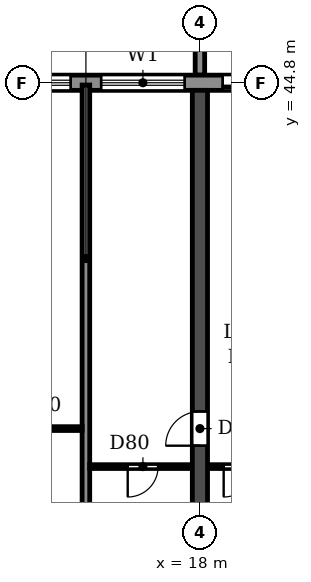
"""IFC4 building model, lengths in metres.
Left out: names, types, materials, properties, quantities, classifications, styles, units other than length and angle.
Written with IfcOpenShell. Run it as: python <this file> out.ifc"""

import sys

from ifc_helpers import new_model, si_unit, direction, frame, frame_2d, origin, place, context, subcontext, project, spatial, polyline, rectangle, outline, extrude, source, transform, mapped, element, fill, save


model = new_model("IFC4")
c1 = context("Model", 3, precision=1e-05, world=origin(), true_north=direction((0.0, 1.0)))
c2 = subcontext(c1, "Body", "Model", "MODEL_VIEW")
j1 = project(units=[si_unit("LENGTHUNIT", "METRE"), si_unit("PLANEANGLEUNIT", "RADIAN")], contexts=[c1])
p1 = place(None, origin())
s1 = spatial("IfcSite", under=j1, at=p1, CompositionType="ELEMENT")
p2 = place(p1, origin())
s2 = spatial("IfcBuilding", under=s1, at=p2, CompositionType="ELEMENT")
p3 = place(p2, frame((0.0, 0.0, 26.7)))
s3 = spatial("IfcBuildingStorey", under=s2, at=p3, CompositionType="ELEMENT", Elevation=26.7)
p4 = place(p3, frame((18.0, 30.55, 0.0), z_axis=(0.0, 0.0, 1.0), x_axis=(0.0, 1.0, 0.0)))
e1 = element("IfcWall", 1, at=p4, inside=s3, PredefinedType="SHEAR", context=c2, shape_type="SweptSolid", body=[
    extrude(rectangle(XDim=14.05, YDim=0.4, at=frame_2d((7.025, 0.0))), origin(), (0.0, 0.0, 1.0), 3.05),
])
p5 = place(p4, frame((4.7, 0.0, 0.0)))
e2 = element("IfcOpeningElement", 2, at=p5, cuts=e1, PredefinedType="OPENING", context=c2, shape_type="SweptSolid", body=[
    extrude(rectangle(XDim=0.9, YDim=2.1, at=frame_2d((0.45, 1.05))), frame((0.0, 0.21, 0.0), z_axis=(0.0, -1.0, 0.0), x_axis=(1.0, 0.0, 0.0)), (0.0, 0.0, 1.0), 0.42),
])
p6 = place(p3, frame((97.317, 44.8, 0.0), z_axis=(0.0, 0.0, 1.0), x_axis=(-1.0, 0.0, 0.0)))
e3 = element("IfcWall", 3, at=p6, inside=s3, PredefinedType="STANDARD", context=c2, shape_type="SweptSolid", body=[
    extrude(rectangle(XDim=92.634, YDim=0.4, at=frame_2d((46.317, 0.0))), origin(), (0.0, 0.0, 1.0), 3.05),
])
p7 = place(p6, frame((88.717, 0.0, 0.9)))
e4 = element("IfcOpeningElement", 4, at=p7, cuts=e3, PredefinedType="OPENING", context=c2, shape_type="SweptSolid", body=[
    extrude(rectangle(XDim=2.2, YDim=1.5, at=frame_2d((1.1, 0.75))), frame((0.0, 0.21, 0.0), z_axis=(0.0, -1.0, 0.0), x_axis=(1.0, 0.0, 0.0)), (0.0, 0.0, 1.0), 0.42),
])
p8 = place(p6, frame((85.917, 0.0, 0.0)))
e5 = element("IfcOpeningElement", 5, at=p8, cuts=e3, PredefinedType="OPENING", context=c2, shape_type="SweptSolid", body=[
    extrude(rectangle(XDim=1.8, YDim=2.4, at=frame_2d((0.9, 1.2))), frame((0.0, 0.21, 0.0), z_axis=(0.0, -1.0, 0.0), x_axis=(1.0, 0.0, 0.0)), (0.0, 0.0, 1.0), 0.42),
])
p9 = place(p6, frame((82.717, 0.0, 0.9)))
e6 = element("IfcOpeningElement", 6, at=p9, cuts=e3, PredefinedType="OPENING", context=c2, shape_type="SweptSolid", body=[
    extrude(rectangle(XDim=2.2, YDim=1.5, at=frame_2d((1.1, 0.75))), frame((0.0, 0.21, 0.0), z_axis=(0.0, -1.0, 0.0), x_axis=(1.0, 0.0, 0.0)), (0.0, 0.0, 1.0), 0.42),
])
p10 = place(p6, frame((79.717, 0.0, 0.9)))
e7 = element("IfcOpeningElement", 7, at=p10, cuts=e3, PredefinedType="OPENING", context=c2, shape_type="SweptSolid", body=[
    extrude(rectangle(XDim=2.2, YDim=1.5, at=frame_2d((1.1, 0.75))), frame((0.0, 0.21, 0.0), z_axis=(0.0, -1.0, 0.0), x_axis=(1.0, 0.0, 0.0)), (0.0, 0.0, 1.0), 0.42),
])
p11 = place(p6, frame((76.917, 0.0, 0.0)))
e8 = element("IfcOpeningElement", 8, at=p11, cuts=e3, PredefinedType="OPENING", context=c2, shape_type="SweptSolid", body=[
    extrude(rectangle(XDim=1.8, YDim=2.4, at=frame_2d((0.9, 1.2))), frame((0.0, 0.21, 0.0), z_axis=(0.0, -1.0, 0.0), x_axis=(1.0, 0.0, 0.0)), (0.0, 0.0, 1.0), 0.42),
])
p12 = place(p6, frame((73.717, 0.0, 0.9)))
e9 = element("IfcOpeningElement", 9, at=p12, cuts=e3, PredefinedType="OPENING", context=c2, shape_type="SweptSolid", body=[
    extrude(rectangle(XDim=2.2, YDim=1.5, at=frame_2d((1.1, 0.75))), frame((0.0, 0.21, 0.0), z_axis=(0.0, -1.0, 0.0), x_axis=(1.0, 0.0, 0.0)), (0.0, 0.0, 1.0), 0.42),
])
p13 = place(p6, frame((70.717, 0.0, 0.9)))
e10 = element("IfcOpeningElement", 10, at=p13, cuts=e3, PredefinedType="OPENING", context=c2, shape_type="SweptSolid", body=[
    extrude(rectangle(XDim=2.2, YDim=1.5, at=frame_2d((1.1, 0.75))), frame((0.0, 0.21, 0.0), z_axis=(0.0, -1.0, 0.0), x_axis=(1.0, 0.0, 0.0)), (0.0, 0.0, 1.0), 0.42),
])
p14 = place(p6, frame((67.717, 0.0, 0.9)))
e11 = element("IfcOpeningElement", 11, at=p14, cuts=e3, PredefinedType="OPENING", context=c2, shape_type="SweptSolid", body=[
    extrude(rectangle(XDim=2.2, YDim=1.5, at=frame_2d((1.1, 0.75))), frame((0.0, 0.21, 0.0), z_axis=(0.0, -1.0, 0.0), x_axis=(1.0, 0.0, 0.0)), (0.0, 0.0, 1.0), 0.42),
])
p15 = place(p6, frame((64.917, 0.0, 0.0)))
e12 = element("IfcOpeningElement", 12, at=p15, cuts=e3, PredefinedType="OPENING", context=c2, shape_type="SweptSolid", body=[
    extrude(rectangle(XDim=1.8, YDim=2.4, at=frame_2d((0.9, 1.2))), frame((0.0, 0.21, 0.0), z_axis=(0.0, -1.0, 0.0), x_axis=(1.0, 0.0, 0.0)), (0.0, 0.0, 1.0), 0.42),
])
p16 = place(p6, frame((61.717, 0.0, 0.9)))
e13 = element("IfcOpeningElement", 13, at=p16, cuts=e3, PredefinedType="OPENING", context=c2, shape_type="SweptSolid", body=[
    extrude(rectangle(XDim=2.2, YDim=1.5, at=frame_2d((1.1, 0.75))), frame((0.0, 0.21, 0.0), z_axis=(0.0, -1.0, 0.0), x_axis=(1.0, 0.0, 0.0)), (0.0, 0.0, 1.0), 0.42),
])
p17 = place(p6, frame((58.717, 0.0, 0.9)))
e14 = element("IfcOpeningElement", 14, at=p17, cuts=e3, PredefinedType="OPENING", context=c2, shape_type="SweptSolid", body=[
    extrude(rectangle(XDim=2.2, YDim=1.5, at=frame_2d((1.1, 0.75))), frame((0.0, 0.21, 0.0), z_axis=(0.0, -1.0, 0.0), x_axis=(1.0, 0.0, 0.0)), (0.0, 0.0, 1.0), 0.42),
])
p18 = place(p6, frame((55.917, 0.0, 0.0)))
e15 = element("IfcOpeningElement", 15, at=p18, cuts=e3, PredefinedType="OPENING", context=c2, shape_type="SweptSolid", body=[
    extrude(rectangle(XDim=1.8, YDim=2.4, at=frame_2d((0.9, 1.2))), frame((0.0, 0.21, 0.0), z_axis=(0.0, -1.0, 0.0), x_axis=(1.0, 0.0, 0.0)), (0.0, 0.0, 1.0), 0.42),
])
p19 = place(p6, frame((52.917, 0.0, 0.0)))
e16 = element("IfcOpeningElement", 16, at=p19, cuts=e3, PredefinedType="OPENING", context=c2, shape_type="SweptSolid", body=[
    extrude(rectangle(XDim=1.8, YDim=2.4, at=frame_2d((0.9, 1.2))), frame((0.0, 0.21, 0.0), z_axis=(0.0, -1.0, 0.0), x_axis=(1.0, 0.0, 0.0)), (0.0, 0.0, 1.0), 0.42),
])
p20 = place(p6, frame((49.717, 0.0, 0.9)))
e17 = element("IfcOpeningElement", 17, at=p20, cuts=e3, PredefinedType="OPENING", context=c2, shape_type="SweptSolid", body=[
    extrude(rectangle(XDim=2.2, YDim=1.5, at=frame_2d((1.1, 0.75))), frame((0.0, 0.21, 0.0), z_axis=(0.0, -1.0, 0.0), x_axis=(1.0, 0.0, 0.0)), (0.0, 0.0, 1.0), 0.42),
])
p21 = place(p6, frame((46.917, 0.0, 0.0)))
e18 = element("IfcOpeningElement", 18, at=p21, cuts=e3, PredefinedType="OPENING", context=c2, shape_type="SweptSolid", body=[
    extrude(rectangle(XDim=1.8, YDim=2.4, at=frame_2d((0.9, 1.2))), frame((0.0, 0.21, 0.0), z_axis=(0.0, -1.0, 0.0), x_axis=(1.0, 0.0, 0.0)), (0.0, 0.0, 1.0), 0.42),
])
p22 = place(p6, frame((43.717, 0.0, 0.9)))
e19 = element("IfcOpeningElement", 19, at=p22, cuts=e3, PredefinedType="OPENING", context=c2, shape_type="SweptSolid", body=[
    extrude(rectangle(XDim=2.2, YDim=1.5, at=frame_2d((1.1, 0.75))), frame((0.0, 0.21, 0.0), z_axis=(0.0, -1.0, 0.0), x_axis=(1.0, 0.0, 0.0)), (0.0, 0.0, 1.0), 0.42),
])
p23 = place(p6, frame((40.717, 0.0, 0.9)))
e20 = element("IfcOpeningElement", 20, at=p23, cuts=e3, PredefinedType="OPENING", context=c2, shape_type="SweptSolid", body=[
    extrude(rectangle(XDim=2.2, YDim=1.5, at=frame_2d((1.1, 0.75))), frame((0.0, 0.21, 0.0), z_axis=(0.0, -1.0, 0.0), x_axis=(1.0, 0.0, 0.0)), (0.0, 0.0, 1.0), 0.42),
])
p24 = place(p6, frame((37.917, 0.0, 0.0)))
e21 = element("IfcOpeningElement", 21, at=p24, cuts=e3, PredefinedType="OPENING", context=c2, shape_type="SweptSolid", body=[
    extrude(rectangle(XDim=1.8, YDim=2.4, at=frame_2d((0.9, 1.2))), frame((0.0, 0.21, 0.0), z_axis=(0.0, -1.0, 0.0), x_axis=(1.0, 0.0, 0.0)), (0.0, 0.0, 1.0), 0.42),
])
p25 = place(p6, frame((34.917, 0.0, 0.0)))
e22 = element("IfcOpeningElement", 22, at=p25, cuts=e3, PredefinedType="OPENING", context=c2, shape_type="SweptSolid", body=[
    extrude(rectangle(XDim=1.8, YDim=2.4, at=frame_2d((0.9, 1.2))), frame((0.0, 0.21, 0.0), z_axis=(0.0, -1.0, 0.0), x_axis=(1.0, 0.0, 0.0)), (0.0, 0.0, 1.0), 0.42),
])
p26 = place(p6, frame((31.717, 0.0, 0.9)))
e23 = element("IfcOpeningElement", 23, at=p26, cuts=e3, PredefinedType="OPENING", context=c2, shape_type="SweptSolid", body=[
    extrude(rectangle(XDim=2.2, YDim=1.5, at=frame_2d((1.1, 0.75))), frame((0.0, 0.21, 0.0), z_axis=(0.0, -1.0, 0.0), x_axis=(1.0, 0.0, 0.0)), (0.0, 0.0, 1.0), 0.42),
])
p27 = place(p6, frame((28.717, 0.0, 0.9)))
e24 = element("IfcOpeningElement", 24, at=p27, cuts=e3, PredefinedType="OPENING", context=c2, shape_type="SweptSolid", body=[
    extrude(rectangle(XDim=2.2, YDim=1.5, at=frame_2d((1.1, 0.75))), frame((0.0, 0.21, 0.0), z_axis=(0.0, -1.0, 0.0), x_axis=(1.0, 0.0, 0.0)), (0.0, 0.0, 1.0), 0.42),
])
p28 = place(p6, frame((25.717, 0.0, 0.9)))
e25 = element("IfcOpeningElement", 25, at=p28, cuts=e3, PredefinedType="OPENING", context=c2, shape_type="SweptSolid", body=[
    extrude(rectangle(XDim=2.2, YDim=1.5, at=frame_2d((1.1, 0.75))), frame((0.0, 0.21, 0.0), z_axis=(0.0, -1.0, 0.0), x_axis=(1.0, 0.0, 0.0)), (0.0, 0.0, 1.0), 0.42),
])
p29 = place(p6, frame((22.717, 0.0, 0.9)))
e26 = element("IfcOpeningElement", 26, at=p29, cuts=e3, PredefinedType="OPENING", context=c2, shape_type="SweptSolid", body=[
    extrude(rectangle(XDim=2.2, YDim=1.5, at=frame_2d((1.1, 0.75))), frame((0.0, 0.21, 0.0), z_axis=(0.0, -1.0, 0.0), x_axis=(1.0, 0.0, 0.0)), (0.0, 0.0, 1.0), 0.42),
])
p30 = place(p6, frame((19.917, 0.0, 0.0)))
e27 = element("IfcOpeningElement", 27, at=p30, cuts=e3, PredefinedType="OPENING", context=c2, shape_type="SweptSolid", body=[
    extrude(rectangle(XDim=1.8, YDim=2.4, at=frame_2d((0.9, 1.2))), frame((0.0, 0.21, 0.0), z_axis=(0.0, -1.0, 0.0), x_axis=(1.0, 0.0, 0.0)), (0.0, 0.0, 1.0), 0.42),
])
p31 = place(p6, frame((16.717, 0.0, 0.9)))
e28 = element("IfcOpeningElement", 28, at=p31, cuts=e3, PredefinedType="OPENING", context=c2, shape_type="SweptSolid", body=[
    extrude(rectangle(XDim=2.2, YDim=1.5, at=frame_2d((1.1, 0.75))), frame((0.0, 0.21, 0.0), z_axis=(0.0, -1.0, 0.0), x_axis=(1.0, 0.0, 0.0)), (0.0, 0.0, 1.0), 0.42),
])
p32 = place(p6, frame((13.717, 0.0, 0.9)))
e29 = element("IfcOpeningElement", 29, at=p32, cuts=e3, PredefinedType="OPENING", context=c2, shape_type="SweptSolid", body=[
    extrude(rectangle(XDim=2.2, YDim=1.5, at=frame_2d((1.1, 0.75))), frame((0.0, 0.21, 0.0), z_axis=(0.0, -1.0, 0.0), x_axis=(1.0, 0.0, 0.0)), (0.0, 0.0, 1.0), 0.42),
])
p33 = place(p6, frame((10.717, 0.0, 0.9)))
e30 = element("IfcOpeningElement", 30, at=p33, cuts=e3, PredefinedType="OPENING", context=c2, shape_type="SweptSolid", body=[
    extrude(rectangle(XDim=2.2, YDim=1.5, at=frame_2d((1.1, 0.75))), frame((0.0, 0.21, 0.0), z_axis=(0.0, -1.0, 0.0), x_axis=(1.0, 0.0, 0.0)), (0.0, 0.0, 1.0), 0.42),
])
p34 = place(p6, frame((7.917, 0.0, 0.0)))
e31 = element("IfcOpeningElement", 31, at=p34, cuts=e3, PredefinedType="OPENING", context=c2, shape_type="SweptSolid", body=[
    extrude(rectangle(XDim=1.8, YDim=2.4, at=frame_2d((0.9, 1.2))), frame((0.0, 0.21, 0.0), z_axis=(0.0, -1.0, 0.0), x_axis=(1.0, 0.0, 0.0)), (0.0, 0.0, 1.0), 0.42),
])
p35 = place(p6, frame((4.917, 0.0, 0.0)))
e32 = element("IfcOpeningElement", 32, at=p35, cuts=e3, PredefinedType="OPENING", context=c2, shape_type="SweptSolid", body=[
    extrude(rectangle(XDim=1.8, YDim=2.4, at=frame_2d((0.9, 1.2))), frame((0.0, 0.21, 0.0), z_axis=(0.0, -1.0, 0.0), x_axis=(1.0, 0.0, 0.0)), (0.0, 0.0, 1.0), 0.42),
])
p36 = place(p6, frame((1.717, 0.0, 0.9)))
e33 = element("IfcOpeningElement", 33, at=p36, cuts=e3, PredefinedType="OPENING", context=c2, shape_type="SweptSolid", body=[
    extrude(rectangle(XDim=2.2, YDim=1.5, at=frame_2d((1.1, 0.75))), frame((0.0, 0.21, 0.0), z_axis=(0.0, -1.0, 0.0), x_axis=(1.0, 0.0, 0.0)), (0.0, 0.0, 1.0), 0.42),
])
m1 = source(origin(), c2, "Body", "SweptSolid", [
    extrude(outline(polyline([(0.0, 0.0), (0.25, 0.0), (0.25, 3.1), (0.0, 3.1), (0.0, 0.0)])), origin(), (0.0, 0.0, 1.0), 3.1),
])
p37 = place(p3, frame((17.875, 45.0, 0.0)))
e34 = element("IfcWall", 34, at=p37, inside=s3, PredefinedType="STANDARD", context=c2, shape_type="MappedRepresentation", body=[
    mapped(m1, transform((0.0, 0.0, 0.0))),
])
p38 = place(p3, frame((15.0, 30.56, 0.0), z_axis=(0.0, 0.0, 1.0), x_axis=(0.0, 1.0, 0.0)))
e35 = element("IfcWall", 35, at=p38, inside=s3, PredefinedType="PARTITIONING", context=c2, shape_type="SweptSolid", body=[
    extrude(rectangle(XDim=14.18, YDim=0.2, at=frame_2d((7.09, 0.0))), origin(), (0.0, 0.0, 1.0), 3.05),
])
p39 = place(p3, frame((15.1, 34.7, 0.0), z_axis=(0.0, 0.0, 1.0), x_axis=(1.0, 0.0, 0.0)))
e36 = element("IfcWall", 36, at=p39, inside=s3, PredefinedType="PARTITIONING", context=c2, shape_type="SweptSolid", body=[
    extrude(rectangle(XDim=2.69, YDim=0.1, at=frame_2d((1.345, 0.0))), origin(), (0.0, 0.0, 1.0), 3.05),
])
p40 = place(p39, frame((1.0, 0.0, 0.0)))
e37 = element("IfcOpeningElement", 37, at=p40, cuts=e36, PredefinedType="OPENING", context=c2, shape_type="SweptSolid", body=[
    extrude(rectangle(XDim=0.8, YDim=2.1, at=frame_2d((0.4, 1.05))), frame((0.0, 0.06, 0.0), z_axis=(0.0, -1.0, 0.0), x_axis=(1.0, 0.0, 0.0)), (0.0, 0.0, 1.0), 0.12),
])
p41 = place(p3, frame((18.21, 34.7, 0.0), z_axis=(0.0, 0.0, 1.0), x_axis=(1.0, 0.0, 0.0)))
e38 = element("IfcWall", 38, at=p41, inside=s3, PredefinedType="PARTITIONING", context=c2, shape_type="SweptSolid", body=[
    extrude(rectangle(XDim=1.89, YDim=0.1, at=frame_2d((0.945, 0.0))), origin(), (0.0, 0.0, 1.0), 3.05),
])
p42 = place(p41, frame((0.415, 0.0, 0.0)))
e39 = element("IfcOpeningElement", 39, at=p42, cuts=e38, PredefinedType="OPENING", context=c2, shape_type="SweptSolid", body=[
    extrude(rectangle(XDim=0.8, YDim=2.1, at=frame_2d((0.4, 1.05))), frame((0.0, 0.06, 0.0), z_axis=(0.0, -1.0, 0.0), x_axis=(1.0, 0.0, 0.0)), (0.0, 0.0, 1.0), 0.12),
])
p43 = place(p3, frame((12.21, 35.7, 0.0), z_axis=(0.0, 0.0, 1.0), x_axis=(1.0, 0.0, 0.0)))
e40 = element("IfcWall", 40, at=p43, inside=s3, PredefinedType="PARTITIONING", context=c2, shape_type="SweptSolid", body=[
    extrude(rectangle(XDim=2.69, YDim=0.1, at=frame_2d((1.345, 0.0))), origin(), (0.0, 0.0, 1.0), 3.05),
])
p44 = place(p43, frame((0.89, 0.0, 0.0)))
e41 = element("IfcOpeningElement", 41, at=p44, cuts=e40, PredefinedType="OPENING", context=c2, shape_type="SweptSolid", body=[
    extrude(rectangle(XDim=0.8, YDim=2.1, at=frame_2d((0.4, 1.05))), frame((0.0, 0.06, 0.0), z_axis=(0.0, -1.0, 0.0), x_axis=(1.0, 0.0, 0.0)), (0.0, 0.0, 1.0), 0.12),
])
p45 = place(p9, origin())
e42 = element("IfcWindow", 42, at=p45, inside=s3, PartitioningType="DOUBLE_PANEL_HORIZONTAL", PredefinedType="WINDOW", context=c2, shape_type="SweptSolid", body=[
    extrude(rectangle(XDim=2.2, YDim=1.5, at=frame_2d((1.1, 0.75))), frame((0.0, 0.03, 0.0), z_axis=(0.0, -1.0, 0.0), x_axis=(1.0, 0.0, 0.0)), (0.0, 0.0, 1.0), 0.06),
])
fill(e6, e42)
p46 = place(p10, origin())
e43 = element("IfcWindow", 43, at=p46, inside=s3, PartitioningType="DOUBLE_PANEL_HORIZONTAL", PredefinedType="WINDOW", context=c2, shape_type="SweptSolid", body=[
    extrude(rectangle(XDim=2.2, YDim=1.5, at=frame_2d((1.1, 0.75))), frame((0.0, 0.03, 0.0), z_axis=(0.0, -1.0, 0.0), x_axis=(1.0, 0.0, 0.0)), (0.0, 0.0, 1.0), 0.06),
])
fill(e7, e43)
p47 = place(p11, origin())
e44 = element("IfcDoor", 44, at=p47, inside=s3, OperationType="DOUBLE_DOOR_SLIDING", PredefinedType="DOOR", context=c2, shape_type="SweptSolid", body=[
    extrude(rectangle(XDim=1.8, YDim=2.4, at=frame_2d((0.9, 1.2))), frame((0.0, 0.025, 0.0), z_axis=(0.0, -1.0, 0.0), x_axis=(1.0, 0.0, 0.0)), (0.0, 0.0, 1.0), 0.05),
])
fill(e8, e44)
p48 = place(p40, frame((0.8, 0.0, 0.0), z_axis=(0.0, 0.0, 1.0), x_axis=(-1.0, 0.0, 0.0)))
e45 = element("IfcDoor", 45, at=p48, inside=s3, OperationType="SINGLE_SWING_RIGHT", PredefinedType="DOOR", context=c2, shape_type="SweptSolid", body=[
    extrude(rectangle(XDim=0.8, YDim=2.1, at=frame_2d((0.4, 1.05))), frame((0.0, 0.025, 0.0), z_axis=(0.0, -1.0, 0.0), x_axis=(1.0, 0.0, 0.0)), (0.0, 0.0, 1.0), 0.05),
])
fill(e37, e45)
p49 = place(p5, origin())
e46 = element("IfcDoor", 46, at=p49, inside=s3, OperationType="SINGLE_SWING_LEFT", PredefinedType="DOOR", context=c2, shape_type="SweptSolid", body=[
    extrude(rectangle(XDim=0.9, YDim=2.1, at=frame_2d((0.45, 1.05))), frame((0.0, 0.025, 0.0), z_axis=(0.0, -1.0, 0.0), x_axis=(1.0, 0.0, 0.0)), (0.0, 0.0, 1.0), 0.05),
])
fill(e2, e46)
p50 = place(p42, frame((0.8, 0.0, 0.0), z_axis=(0.0, 0.0, 1.0), x_axis=(-1.0, 0.0, 0.0)))
e47 = element("IfcDoor", 47, at=p50, inside=s3, OperationType="SINGLE_SWING_RIGHT", PredefinedType="DOOR", context=c2, shape_type="SweptSolid", body=[
    extrude(rectangle(XDim=0.8, YDim=2.1, at=frame_2d((0.4, 1.05))), frame((0.0, 0.025, 0.0), z_axis=(0.0, -1.0, 0.0), x_axis=(1.0, 0.0, 0.0)), (0.0, 0.0, 1.0), 0.05),
])
fill(e39, e47)
save(model, sys.argv[1])
